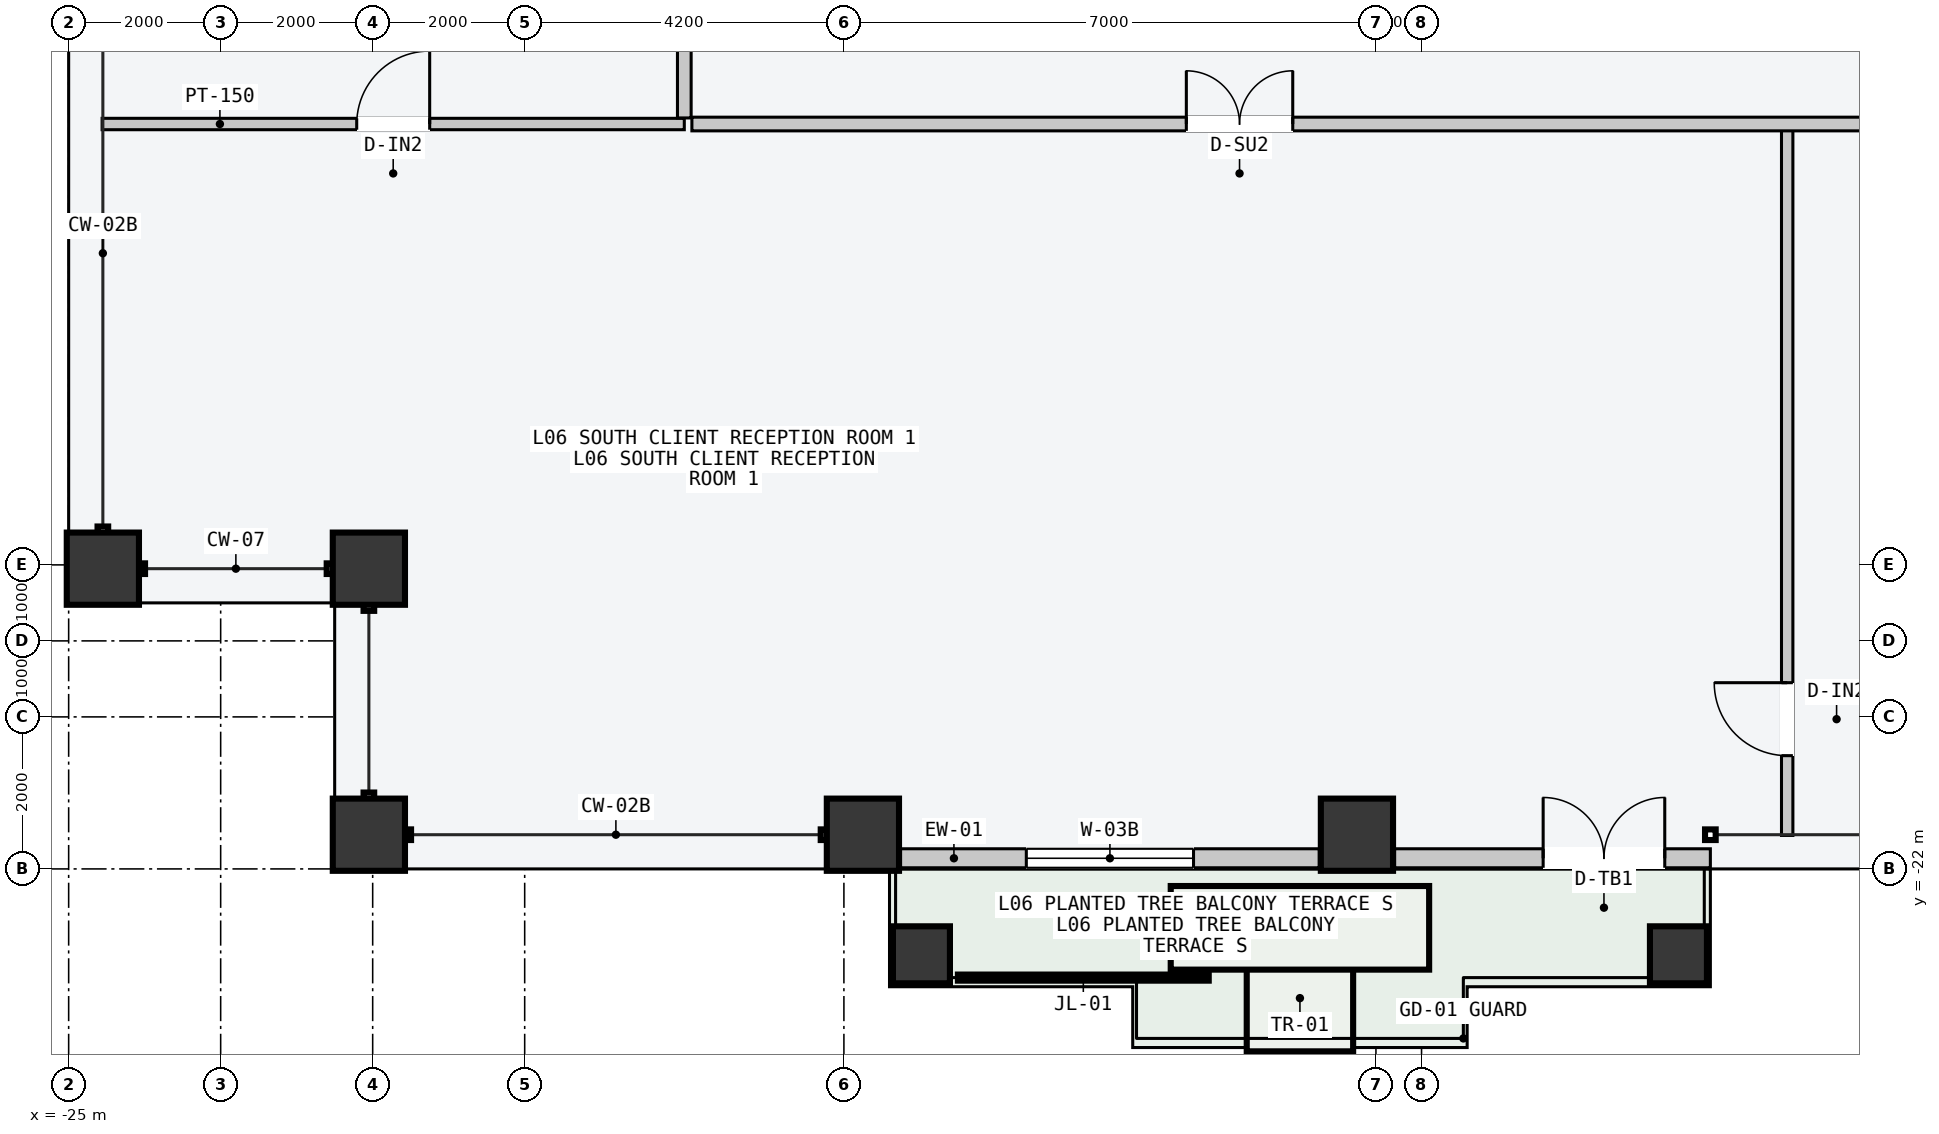
"""IFC4 building model, lengths in metres.
Left out: names, types, materials, properties, quantities, classifications, styles, units other than length and angle.
Written with IfcOpenShell. Run it as: python <this file> out.ifc"""

import sys

from ifc_helpers import new_model, si_unit, direction, frame, frame_2d, origin, origin_2d, place, context, subcontext, project, spatial, rectangle, hollow_rectangle, extrude, element, fill, save


model = new_model("IFC4")
c1 = context("Model", 3, precision=1e-05, world=origin(), true_north=direction((0.0, 1.0)))
c2 = subcontext(c1, "Body", "Model", "MODEL_VIEW")
j1 = project(units=[si_unit("LENGTHUNIT", "METRE"), si_unit("PLANEANGLEUNIT", "RADIAN")], contexts=[c1])
p1 = place(None, origin())
s1 = spatial("IfcSite", under=j1, at=p1, CompositionType="ELEMENT")
p2 = place(p1, origin())
s2 = spatial("IfcBuilding", under=s1, at=p2, CompositionType="ELEMENT")
p3 = place(p2, frame((0.0, 0.0, 27.6)))
s3 = spatial("IfcBuildingStorey", under=s2, at=p3, CompositionType="ELEMENT", Elevation=27.6)
for number, where, z_axis, x_axis in (
    (1, (-21.05, -21.55, 0.0), (0.0, 0.0, 1.0), (1.0, 0.0, 0.0)),
    (2, (-14.55, -21.55, 0.0), (0.0, 0.0, 1.0), (1.0, 0.0, 0.0)),
    (3, (-8.05, -21.55, 0.0), (0.0, 0.0, 1.0), (1.0, 0.0, 0.0)),
    (4, (-24.55, -18.05, 0.0), (0.0, 0.0, 1.0), (0.0, 1.0, 0.0)),
    (5, (-21.05, -18.05, 0.0), (0.0, 0.0, 1.0), (1.0, 0.0, 0.0)),
):
    element("IfcColumn", number, at=place(p3, frame(where, z_axis=z_axis, x_axis=x_axis)), inside=s3, PredefinedType="COLUMN", context=c2, shape_type="SweptSolid", body=[
        extrude(hollow_rectangle(XDim=0.95, YDim=0.95, WallThickness=0.048, at=origin_2d()), origin(), (0.0, 0.0, 1.0), 3.6),
    ])
for number, where, z_axis, x_axis in (
    (6, (-13.78, -23.13, -0.2), (0.0, 0.0, 1.0), (1.0, 0.0, 0.0)),
    (7, (-3.82, -23.13, -0.2), (0.0, 0.0, 1.0), (1.0, 0.0, 0.0)),
):
    element("IfcColumn", number, at=place(p3, frame(where, z_axis=z_axis, x_axis=x_axis)), inside=s3, PredefinedType="COLUMN", context=c2, shape_type="SweptSolid", body=[
        extrude(hollow_rectangle(XDim=0.75, YDim=0.75, WallThickness=0.032, at=origin_2d()), origin(), (0.0, 0.0, 1.0), 3.8),
    ])
p4 = place(p3, frame((-14.055, -21.86, 0.0), z_axis=(0.0, 0.0, 1.0), x_axis=(1.0, 0.0, 0.0)))
e8 = element("IfcWall", 8, at=p4, inside=s3, PredefinedType="STANDARD", context=c2, shape_type="SweptSolid", body=[
    extrude(rectangle(XDim=5.51, YDim=0.25, at=frame_2d((2.755, 0.0))), origin(), (0.0, 0.0, 1.0), 3.4),
])
p5 = place(p4, frame((1.655, 0.0, 0.85)))
e9 = element("IfcOpeningElement", 9, at=p5, cuts=e8, PredefinedType="OPENING", context=c2, shape_type="SweptSolid", body=[
    extrude(rectangle(XDim=2.2, YDim=2.1, at=frame_2d((1.1, 1.05))), frame((0.0, 0.135, 0.0), z_axis=(0.0, -1.0, 0.0), x_axis=(1.0, 0.0, 0.0)), (0.0, 0.0, 1.0), 0.27),
])
p6 = place(p3, frame((-7.555, -21.86, 0.0), z_axis=(0.0, 0.0, 1.0), x_axis=(1.0, 0.0, 0.0)))
e10 = element("IfcWall", 10, at=p6, inside=s3, PredefinedType="STANDARD", context=c2, shape_type="SweptSolid", body=[
    extrude(rectangle(XDim=4.155, YDim=0.25, at=frame_2d((2.078, 0.0))), origin(), (0.0, 0.0, 1.0), 3.4),
])
p7 = place(p6, frame((1.955, 0.0, 0.0)))
e11 = element("IfcOpeningElement", 11, at=p7, cuts=e10, PredefinedType="OPENING", context=c2, shape_type="SweptSolid", body=[
    extrude(rectangle(XDim=1.6, YDim=2.2, at=frame_2d((0.8, 1.1))), frame((0.0, 0.135, 0.0), z_axis=(0.0, -1.0, 0.0), x_axis=(1.0, 0.0, 0.0)), (0.0, 0.0, 1.0), 0.27),
])
p8 = place(p3, frame((-2.389, -21.56, 0.0), z_axis=(0.0, 0.0, 1.0), x_axis=(0.0, 1.0, 0.0)))
e12 = element("IfcWall", 12, at=p8, inside=s3, PredefinedType="PARTITIONING", context=c2, shape_type="SweptSolid", body=[
    extrude(rectangle(XDim=9.3, YDim=0.15, at=frame_2d((4.65, 0.0))), origin(), (0.0, 0.0, 1.0), 3.4),
])
p9 = place(p8, frame((1.05, 0.0, 0.0)))
e13 = element("IfcOpeningElement", 13, at=p9, cuts=e12, PredefinedType="OPENING", context=c2, shape_type="SweptSolid", body=[
    extrude(rectangle(XDim=0.96, YDim=2.18, at=frame_2d((0.48, 1.09))), frame((0.0, 0.085, 0.0), z_axis=(0.0, -1.0, 0.0), x_axis=(1.0, 0.0, 0.0)), (0.0, 0.0, 1.0), 0.17),
])
p10 = place(p3, frame((-16.8, -12.2, 0.0), z_axis=(0.0, 0.0, 1.0), x_axis=(1.0, 0.0, 0.0)))
e14 = element("IfcWall", 14, at=p10, inside=s3, PredefinedType="PARTITIONING", context=c2, shape_type="SweptSolid", body=[
    extrude(rectangle(XDim=33.6, YDim=0.18, at=frame_2d((16.8, 0.0))), origin(), (0.0, 0.0, 1.0), 3.4),
])
p11 = place(p10, frame((6.505, 0.0, 0.0)))
e15 = element("IfcOpeningElement", 15, at=p11, cuts=e14, PredefinedType="OPENING", context=c2, shape_type="SweptSolid", body=[
    extrude(rectangle(XDim=1.4, YDim=2.2, at=frame_2d((0.7, 1.1))), frame((0.0, 0.1, 0.0), z_axis=(0.0, -1.0, 0.0), x_axis=(1.0, 0.0, 0.0)), (0.0, 0.0, 1.0), 0.2),
])
p12 = place(p10, frame((20.133, 0.0, 0.0)))
e16 = element("IfcOpeningElement", 16, at=p12, cuts=e14, PredefinedType="OPENING", context=c2, shape_type="SweptSolid", body=[
    extrude(rectangle(XDim=0.9, YDim=2.15, at=frame_2d((0.45, 1.075))), frame((0.0, 0.1, 0.0), z_axis=(0.0, -1.0, 0.0), x_axis=(1.0, 0.0, 0.0)), (0.0, 0.0, 1.0), 0.2),
])
p13 = place(p10, frame((29.698, 0.0, 0.0)))
e17 = element("IfcOpeningElement", 17, at=p13, cuts=e14, PredefinedType="OPENING", context=c2, shape_type="SweptSolid", body=[
    extrude(rectangle(XDim=0.96, YDim=2.18, at=frame_2d((0.48, 1.09))), frame((0.0, 0.1, 0.0), z_axis=(0.0, -1.0, 0.0), x_axis=(1.0, 0.0, 0.0)), (0.0, 0.0, 1.0), 0.2),
])
p14 = place(p3, frame((-24.56, -12.2, 0.0), z_axis=(0.0, 0.0, 1.0), x_axis=(1.0, 0.0, 0.0)))
e18 = element("IfcWall", 18, at=p14, inside=s3, PredefinedType="PARTITIONING", context=c2, shape_type="SweptSolid", body=[
    extrude(rectangle(XDim=7.66, YDim=0.15, at=frame_2d((3.83, 0.0))), origin(), (0.0, 0.0, 1.0), 3.4),
])
p15 = place(p14, frame((3.35, 0.0, 0.0)))
e19 = element("IfcOpeningElement", 19, at=p15, cuts=e18, PredefinedType="OPENING", context=c2, shape_type="SweptSolid", body=[
    extrude(rectangle(XDim=0.96, YDim=2.18, at=frame_2d((0.48, 1.09))), frame((0.0, 0.085, 0.0), z_axis=(0.0, -1.0, 0.0), x_axis=(1.0, 0.0, 0.0)), (0.0, 0.0, 1.0), 0.17),
])
p16 = place(p3, frame((-16.9, -12.12, 0.0), z_axis=(0.0, 0.0, 1.0), x_axis=(0.0, 1.0, 0.0)))
e20 = element("IfcWall", 20, at=p16, inside=s3, PredefinedType="PARTITIONING", context=c2, shape_type="SweptSolid", body=[
    extrude(rectangle(XDim=24.24, YDim=0.18, at=frame_2d((12.12, 0.0))), origin(), (0.0, 0.0, 1.0), 3.4),
])
p17 = place(p16, frame((11.59, 0.0, 0.0)))
e21 = element("IfcOpeningElement", 21, at=p17, cuts=e20, PredefinedType="OPENING", context=c2, shape_type="SweptSolid", body=[
    extrude(rectangle(XDim=1.06, YDim=2.2, at=frame_2d((0.53, 1.1))), frame((0.0, 0.1, 0.0), z_axis=(0.0, -1.0, 0.0), x_axis=(1.0, 0.0, 0.0)), (0.0, 0.0, 1.0), 0.2),
])
p18 = place(p5, origin())
e22 = element("IfcWindow", 22, at=p18, inside=s3, PartitioningType="SINGLE_PANEL", PredefinedType="WINDOW", context=c2, shape_type="SweptSolid", body=[
    extrude(rectangle(XDim=2.2, YDim=2.1, at=frame_2d((1.1, 1.05))), frame((0.0, 0.03, 0.0), z_axis=(0.0, -1.0, 0.0), x_axis=(1.0, 0.0, 0.0)), (0.0, 0.0, 1.0), 0.06),
])
fill(e9, e22)
p19 = place(p7, origin())
e23 = element("IfcDoor", 23, at=p19, inside=s3, OperationType="DOUBLE_DOOR_SINGLE_SWING", PredefinedType="DOOR", context=c2, shape_type="SweptSolid", body=[
    extrude(rectangle(XDim=1.6, YDim=2.2, at=frame_2d((0.8, 1.1))), frame((0.0, 0.025, 0.0), z_axis=(0.0, -1.0, 0.0), x_axis=(1.0, 0.0, 0.0)), (0.0, 0.0, 1.0), 0.05),
])
fill(e11, e23)
p20 = place(p9, origin())
e24 = element("IfcDoor", 24, at=p20, inside=s3, OperationType="SINGLE_SWING_RIGHT", PredefinedType="DOOR", context=c2, shape_type="SweptSolid", body=[
    extrude(rectangle(XDim=0.96, YDim=2.18, at=frame_2d((0.48, 1.09))), frame((0.0, 0.025, 0.0), z_axis=(0.0, -1.0, 0.0), x_axis=(1.0, 0.0, 0.0)), (0.0, 0.0, 1.0), 0.05),
])
fill(e13, e24)
p21 = place(p11, origin())
e25 = element("IfcDoor", 25, at=p21, inside=s3, OperationType="DOUBLE_DOOR_SINGLE_SWING", PredefinedType="DOOR", context=c2, shape_type="SweptSolid", body=[
    extrude(rectangle(XDim=1.4, YDim=2.2, at=frame_2d((0.7, 1.1))), frame((0.0, 0.025, 0.0), z_axis=(0.0, -1.0, 0.0), x_axis=(1.0, 0.0, 0.0)), (0.0, 0.0, 1.0), 0.05),
])
fill(e15, e25)
p22 = place(p15, origin())
e26 = element("IfcDoor", 26, at=p22, inside=s3, OperationType="SINGLE_SWING_RIGHT", PredefinedType="DOOR", context=c2, shape_type="SweptSolid", body=[
    extrude(rectangle(XDim=0.96, YDim=2.18, at=frame_2d((0.48, 1.09))), frame((0.0, 0.025, 0.0), z_axis=(0.0, -1.0, 0.0), x_axis=(1.0, 0.0, 0.0)), (0.0, 0.0, 1.0), 0.05),
])
fill(e19, e26)
save(model, sys.argv[1])
